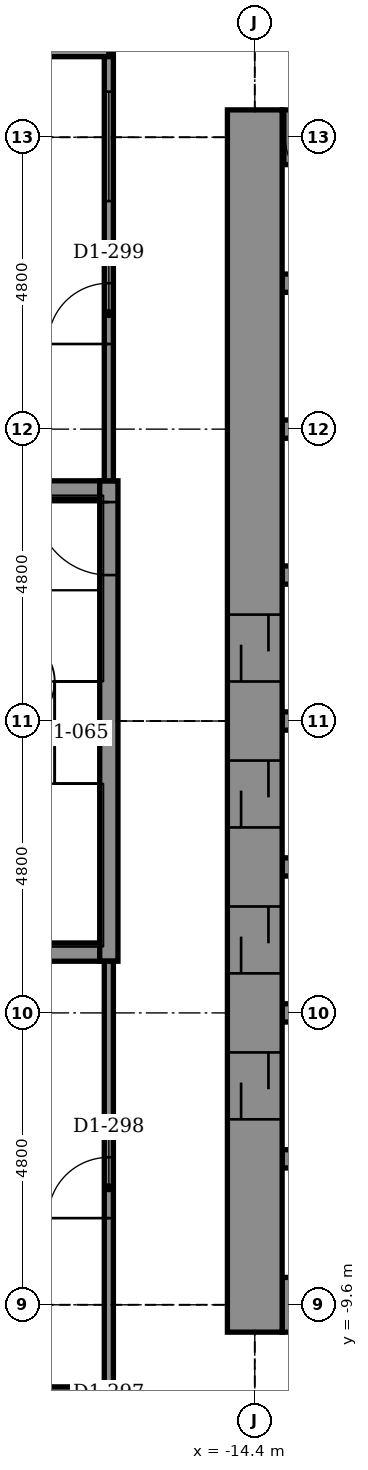
"""IFC4 building model, lengths in metres.
Left out: names, types, materials, properties, quantities, classifications, styles, units other than length and angle.
Written with IfcOpenShell. Run it as: python <this file> out.ifc"""

import sys

from ifc_helpers import new_model, si_unit, direction, frame, frame_2d, origin, place, context, subcontext, project, spatial, rectangle, extrude, element, fill, save


model = new_model("IFC4")
c1 = context("Model", 3, precision=1e-05, world=origin(), true_north=direction((0.0, 1.0)))
c2 = subcontext(c1, "Body", "Model", "MODEL_VIEW")
j1 = project(units=[si_unit("LENGTHUNIT", "METRE"), si_unit("PLANEANGLEUNIT", "RADIAN")], contexts=[c1])
p1 = place(None, origin())
s1 = spatial("IfcSite", under=j1, at=p1, CompositionType="ELEMENT")
p2 = place(p1, origin())
s2 = spatial("IfcBuilding", under=s1, at=p2, CompositionType="ELEMENT")
p3 = place(p2, frame((0.0, 0.0, 109.4)))
s3 = spatial("IfcBuildingStorey", under=s2, at=p3, CompositionType="ELEMENT", Elevation=109.4)
p4 = place(p3, frame((-13.95, -9.6, -0.2), z_axis=(0.0, 0.0, 1.0), x_axis=(1.0, 0.0, 0.0)))
e1 = element("IfcWall", 1, at=p4, inside=s3, PredefinedType="SHEAR", context=c2, shape_type="SweptSolid", body=[
    extrude(rectangle(XDim=3.9, YDim=0.9, at=frame_2d((1.95, 0.0))), origin(), (0.0, 0.0, 1.0), 4.5),
])
p5 = place(p4, frame((0.7, 0.0, 0.2)))
e2 = element("IfcOpeningElement", 2, at=p5, cuts=e1, PredefinedType="OPENING", context=c2, shape_type="SweptSolid", body=[
    extrude(rectangle(XDim=0.9, YDim=2.1, at=frame_2d((0.45, 1.05))), frame((0.0, 0.46, 0.0), z_axis=(0.0, -1.0, 0.0), x_axis=(1.0, 0.0, 0.0)), (0.0, 0.0, 1.0), 0.92),
])
p6 = place(p4, frame((2.95, 0.0, 0.2)))
e3 = element("IfcOpeningElement", 3, at=p6, cuts=e1, PredefinedType="OPENING", context=c2, shape_type="SweptSolid", body=[
    extrude(rectangle(XDim=0.9, YDim=2.1, at=frame_2d((0.45, 1.05))), frame((0.0, 0.46, 0.0), z_axis=(0.0, -1.0, 0.0), x_axis=(1.0, 0.0, 0.0)), (0.0, 0.0, 1.0), 0.92),
])
for number, where, z_axis, x_axis in (
    (4, (-13.95, -7.2, -0.2), (0.0, 0.0, 1.0), (1.0, 0.0, 0.0)),
    (5, (-13.95, -4.8, -0.2), (0.0, 0.0, 1.0), (1.0, 0.0, 0.0)),
):
    element("IfcWall", number, at=place(p3, frame(where, z_axis=z_axis, x_axis=x_axis)), inside=s3, PredefinedType="STANDARD", context=c2, shape_type="SweptSolid", body=[
        extrude(rectangle(XDim=3.9, YDim=0.3, at=frame_2d((1.95, 0.0))), origin(), (0.0, 0.0, 1.0), 4.5),
    ])
p7 = place(p3, frame((-21.45, -3.8, -0.2), z_axis=(0.0, 0.0, 1.0), x_axis=(1.0, 0.0, 0.0)))
e6 = element("IfcWall", 6, at=p7, inside=s3, PredefinedType="STANDARD", context=c2, shape_type="SweptSolid", body=[
    extrude(rectangle(XDim=4.5, YDim=0.3, at=frame_2d((2.25, 0.0))), origin(), (0.0, 0.0, 1.0), 4.5),
])
for number, where, z_axis, x_axis in (
    (7, (-13.95, -2.4, -0.2), (0.0, 0.0, 1.0), (1.0, 0.0, 0.0)),
    (8, (-13.95, 0.0, -0.2), (0.0, 0.0, 1.0), (1.0, 0.0, 0.0)),
    (9, (-13.95, 2.4, -0.2), (0.0, 0.0, 1.0), (1.0, 0.0, 0.0)),
):
    element("IfcWall", number, at=place(p3, frame(where, z_axis=z_axis, x_axis=x_axis)), inside=s3, PredefinedType="STANDARD", context=c2, shape_type="SweptSolid", body=[
        extrude(rectangle(XDim=2.8, YDim=0.3, at=frame_2d((1.4, 0.0))), origin(), (0.0, 0.0, 1.0), 4.5),
    ])
p8 = place(p3, frame((-21.45, 3.8, -0.2), z_axis=(0.0, 0.0, 1.0), x_axis=(1.0, 0.0, 0.0)))
e10 = element("IfcWall", 10, at=p8, inside=s3, PredefinedType="STANDARD", context=c2, shape_type="SweptSolid", body=[
    extrude(rectangle(XDim=4.5, YDim=0.3, at=frame_2d((2.25, 0.0))), origin(), (0.0, 0.0, 1.0), 4.5),
])
for number, where, z_axis, x_axis in (
    (11, (-13.95, 4.8, -0.2), (0.0, 0.0, 1.0), (1.0, 0.0, 0.0)),
    (12, (-13.95, 7.2, -0.2), (0.0, 0.0, 1.0), (1.0, 0.0, 0.0)),
):
    element("IfcWall", number, at=place(p3, frame(where, z_axis=z_axis, x_axis=x_axis)), inside=s3, PredefinedType="STANDARD", context=c2, shape_type="SweptSolid", body=[
        extrude(rectangle(XDim=3.9, YDim=0.3, at=frame_2d((1.95, 0.0))), origin(), (0.0, 0.0, 1.0), 4.5),
    ])
p9 = place(p3, frame((-13.95, 9.6, -0.2), z_axis=(0.0, 0.0, 1.0), x_axis=(1.0, 0.0, 0.0)))
e13 = element("IfcWall", 13, at=p9, inside=s3, PredefinedType="SHEAR", context=c2, shape_type="SweptSolid", body=[
    extrude(rectangle(XDim=3.9, YDim=0.9, at=frame_2d((1.95, 0.0))), origin(), (0.0, 0.0, 1.0), 4.5),
])
p10 = place(p9, frame((0.05, 0.0, 0.2)))
e14 = element("IfcOpeningElement", 14, at=p10, cuts=e13, PredefinedType="OPENING", context=c2, shape_type="SweptSolid", body=[
    extrude(rectangle(XDim=0.9, YDim=2.1, at=frame_2d((0.45, 1.05))), frame((0.0, 0.46, 0.0), z_axis=(0.0, -1.0, 0.0), x_axis=(1.0, 0.0, 0.0)), (0.0, 0.0, 1.0), 0.92),
])
p11 = place(p9, frame((2.3, 0.0, 0.2)))
e15 = element("IfcOpeningElement", 15, at=p11, cuts=e13, PredefinedType="OPENING", context=c2, shape_type="SweptSolid", body=[
    extrude(rectangle(XDim=0.9, YDim=2.1, at=frame_2d((0.45, 1.05))), frame((0.0, 0.46, 0.0), z_axis=(0.0, -1.0, 0.0), x_axis=(1.0, 0.0, 0.0)), (0.0, 0.0, 1.0), 0.92),
])
p12 = place(p3, frame((-16.8, -3.95, -0.2), z_axis=(0.0, 0.0, 1.0), x_axis=(0.0, 1.0, 0.0)))
e16 = element("IfcWall", 16, at=p12, inside=s3, PredefinedType="STANDARD", context=c2, shape_type="SweptSolid", body=[
    extrude(rectangle(XDim=7.9, YDim=0.3, at=frame_2d((3.95, 0.0))), origin(), (0.0, 0.0, 1.0), 4.5),
])
p13 = place(p12, frame((6.35, 0.0, 0.2)))
e17 = element("IfcOpeningElement", 17, at=p13, cuts=e16, PredefinedType="OPENING", context=c2, shape_type="SweptSolid", body=[
    extrude(rectangle(XDim=1.2, YDim=2.1, at=frame_2d((0.6, 1.05))), frame((0.0, 0.16, 0.0), z_axis=(0.0, -1.0, 0.0), x_axis=(1.0, 0.0, 0.0)), (0.0, 0.0, 1.0), 0.32),
])
p14 = place(p3, frame((-14.4, -10.05, -0.2), z_axis=(0.0, 0.0, 1.0), x_axis=(0.0, 1.0, 0.0)))
e18 = element("IfcWall", 18, at=p14, inside=s3, PredefinedType="SHEAR", context=c2, shape_type="SweptSolid", body=[
    extrude(rectangle(XDim=20.1, YDim=0.9, at=frame_2d((10.05, 0.0))), origin(), (0.0, 0.0, 1.0), 4.5),
])
p15 = place(p14, frame((3.5, 0.0, 0.2)))
e19 = element("IfcOpeningElement", 19, at=p15, cuts=e18, PredefinedType="OPENING", context=c2, shape_type="SweptSolid", body=[
    extrude(rectangle(XDim=1.1, YDim=2.1, at=frame_2d((0.55, 1.05))), frame((0.0, 0.46, 0.0), z_axis=(0.0, -1.0, 0.0), x_axis=(1.0, 0.0, 0.0)), (0.0, 0.0, 1.0), 0.92),
])
p16 = place(p14, frame((5.9, 0.0, 0.2)))
e20 = element("IfcOpeningElement", 20, at=p16, cuts=e18, PredefinedType="OPENING", context=c2, shape_type="SweptSolid", body=[
    extrude(rectangle(XDim=1.1, YDim=2.1, at=frame_2d((0.55, 1.05))), frame((0.0, 0.46, 0.0), z_axis=(0.0, -1.0, 0.0), x_axis=(1.0, 0.0, 0.0)), (0.0, 0.0, 1.0), 0.92),
])
p17 = place(p14, frame((8.3, 0.0, 0.2)))
e21 = element("IfcOpeningElement", 21, at=p17, cuts=e18, PredefinedType="OPENING", context=c2, shape_type="SweptSolid", body=[
    extrude(rectangle(XDim=1.1, YDim=2.1, at=frame_2d((0.55, 1.05))), frame((0.0, 0.46, 0.0), z_axis=(0.0, -1.0, 0.0), x_axis=(1.0, 0.0, 0.0)), (0.0, 0.0, 1.0), 0.92),
])
p18 = place(p14, frame((10.7, 0.0, 0.2)))
e22 = element("IfcOpeningElement", 22, at=p18, cuts=e18, PredefinedType="OPENING", context=c2, shape_type="SweptSolid", body=[
    extrude(rectangle(XDim=1.1, YDim=2.1, at=frame_2d((0.55, 1.05))), frame((0.0, 0.46, 0.0), z_axis=(0.0, -1.0, 0.0), x_axis=(1.0, 0.0, 0.0)), (0.0, 0.0, 1.0), 0.92),
])
p19 = place(p3, frame((-16.8, -13.3, 0.0), z_axis=(0.0, 0.0, 1.0), x_axis=(0.0, 1.0, 0.0)))
e23 = element("IfcWall", 23, at=p19, inside=s3, PredefinedType="PARTITIONING", context=c2, shape_type="SweptSolid", body=[
    extrude(rectangle(XDim=9.35, YDim=0.15, at=frame_2d((4.675, 0.0))), origin(), (0.0, 0.0, 1.0), 4.3),
])
p20 = place(p19, frame((0.75, 0.0, 0.0)))
e24 = element("IfcOpeningElement", 24, at=p20, cuts=e23, PredefinedType="OPENING", context=c2, shape_type="SweptSolid", body=[
    extrude(rectangle(XDim=1.0, YDim=2.1, at=frame_2d((0.5, 1.05))), frame((0.0, 0.085, 0.0), z_axis=(0.0, -1.0, 0.0), x_axis=(1.0, 0.0, 0.0)), (0.0, 0.0, 1.0), 0.17),
])
p21 = place(p19, frame((5.125, 0.0, 0.0)))
e25 = element("IfcOpeningElement", 25, at=p21, cuts=e23, PredefinedType="OPENING", context=c2, shape_type="SweptSolid", body=[
    extrude(rectangle(XDim=1.0, YDim=2.1, at=frame_2d((0.5, 1.05))), frame((0.0, 0.085, 0.0), z_axis=(0.0, -1.0, 0.0), x_axis=(1.0, 0.0, 0.0)), (0.0, 0.0, 1.0), 0.17),
])
p22 = place(p3, frame((-16.8, 3.95, 0.0), z_axis=(0.0, 0.0, 1.0), x_axis=(0.0, 1.0, 0.0)))
e26 = element("IfcWall", 26, at=p22, inside=s3, PredefinedType="PARTITIONING", context=c2, shape_type="SweptSolid", body=[
    extrude(rectangle(XDim=8.75, YDim=0.15, at=frame_2d((4.375, 0.0))), origin(), (0.0, 0.0, 1.0), 4.3),
])
p23 = place(p22, frame((2.25, 0.0, 0.0)))
e27 = element("IfcOpeningElement", 27, at=p23, cuts=e26, PredefinedType="OPENING", context=c2, shape_type="SweptSolid", body=[
    extrude(rectangle(XDim=1.0, YDim=2.1, at=frame_2d((0.5, 1.05))), frame((0.0, 0.085, 0.0), z_axis=(0.0, -1.0, 0.0), x_axis=(1.0, 0.0, 0.0)), (0.0, 0.0, 1.0), 0.17),
])
p24 = place(p22, frame((4.6, 0.0, 0.9)))
e28 = element("IfcOpeningElement", 28, at=p24, cuts=e26, PredefinedType="OPENING", context=c2, shape_type="SweptSolid", body=[
    extrude(rectangle(XDim=1.8, YDim=1.5, at=frame_2d((0.9, 0.75))), frame((0.0, 0.085, 0.0), z_axis=(0.0, -1.0, 0.0), x_axis=(1.0, 0.0, 0.0)), (0.0, 0.0, 1.0), 0.17),
])
p25 = place(p3, frame((-25.378, -11.0, 0.0), z_axis=(0.0, 0.0, 1.0), x_axis=(1.0, 0.0, 0.0)))
e29 = element("IfcWall", 29, at=p25, inside=s3, PredefinedType="PARTITIONING", context=c2, shape_type="SweptSolid", body=[
    extrude(rectangle(XDim=8.578, YDim=0.1, at=frame_2d((4.289, 0.0))), origin(), (0.0, 0.0, 1.0), 4.3),
])
p26 = place(p3, frame((-25.378, 11.0, 0.0), z_axis=(0.0, 0.0, 1.0), x_axis=(1.0, 0.0, 0.0)))
e30 = element("IfcWall", 30, at=p26, inside=s3, PredefinedType="PARTITIONING", context=c2, shape_type="SweptSolid", body=[
    extrude(rectangle(XDim=8.578, YDim=0.15, at=frame_2d((4.289, 0.0))), origin(), (0.0, 0.0, 1.0), 4.3),
])
p27 = place(p21, origin())
e31 = element("IfcDoor", 31, at=p27, inside=s3, OperationType="SINGLE_SWING_LEFT", PredefinedType="DOOR", context=c2, shape_type="SweptSolid", body=[
    extrude(rectangle(XDim=1.0, YDim=2.1, at=frame_2d((0.5, 1.05))), frame((0.0, 0.025, 0.0), z_axis=(0.0, -1.0, 0.0), x_axis=(1.0, 0.0, 0.0)), (0.0, 0.0, 1.0), 0.05),
])
fill(e25, e31)
p28 = place(p23, origin())
e32 = element("IfcDoor", 32, at=p28, inside=s3, OperationType="SINGLE_SWING_LEFT", PredefinedType="DOOR", context=c2, shape_type="SweptSolid", body=[
    extrude(rectangle(XDim=1.0, YDim=2.1, at=frame_2d((0.5, 1.05))), frame((0.0, 0.025, 0.0), z_axis=(0.0, -1.0, 0.0), x_axis=(1.0, 0.0, 0.0)), (0.0, 0.0, 1.0), 0.05),
])
fill(e27, e32)
p29 = place(p15, origin())
e33 = element("IfcDoor", 33, at=p29, inside=s3, OperationType="DOUBLE_DOOR_SLIDING", PredefinedType="DOOR", context=c2, shape_type="SweptSolid", body=[
    extrude(rectangle(XDim=1.1, YDim=2.1, at=frame_2d((0.55, 1.05))), frame((0.0, 0.025, 0.0), z_axis=(0.0, -1.0, 0.0), x_axis=(1.0, 0.0, 0.0)), (0.0, 0.0, 1.0), 0.05),
])
fill(e19, e33)
p30 = place(p16, origin())
e34 = element("IfcDoor", 34, at=p30, inside=s3, OperationType="DOUBLE_DOOR_SLIDING", PredefinedType="DOOR", context=c2, shape_type="SweptSolid", body=[
    extrude(rectangle(XDim=1.1, YDim=2.1, at=frame_2d((0.55, 1.05))), frame((0.0, 0.025, 0.0), z_axis=(0.0, -1.0, 0.0), x_axis=(1.0, 0.0, 0.0)), (0.0, 0.0, 1.0), 0.05),
])
fill(e20, e34)
p31 = place(p17, origin())
e35 = element("IfcDoor", 35, at=p31, inside=s3, OperationType="DOUBLE_DOOR_SLIDING", PredefinedType="DOOR", context=c2, shape_type="SweptSolid", body=[
    extrude(rectangle(XDim=1.1, YDim=2.1, at=frame_2d((0.55, 1.05))), frame((0.0, 0.025, 0.0), z_axis=(0.0, -1.0, 0.0), x_axis=(1.0, 0.0, 0.0)), (0.0, 0.0, 1.0), 0.05),
])
fill(e21, e35)
p32 = place(p18, origin())
e36 = element("IfcDoor", 36, at=p32, inside=s3, OperationType="DOUBLE_DOOR_SLIDING", PredefinedType="DOOR", context=c2, shape_type="SweptSolid", body=[
    extrude(rectangle(XDim=1.1, YDim=2.1, at=frame_2d((0.55, 1.05))), frame((0.0, 0.025, 0.0), z_axis=(0.0, -1.0, 0.0), x_axis=(1.0, 0.0, 0.0)), (0.0, 0.0, 1.0), 0.05),
])
fill(e22, e36)
p33 = place(p13, origin())
e37 = element("IfcDoor", 37, at=p33, inside=s3, OperationType="SINGLE_SWING_RIGHT", PredefinedType="DOOR", context=c2, shape_type="SweptSolid", body=[
    extrude(rectangle(XDim=1.2, YDim=2.1, at=frame_2d((0.6, 1.05))), frame((0.0, 0.025, 0.0), z_axis=(0.0, -1.0, 0.0), x_axis=(1.0, 0.0, 0.0)), (0.0, 0.0, 1.0), 0.05),
])
fill(e17, e37)
p34 = place(p10, frame((0.9, 0.0, 0.0), z_axis=(0.0, 0.0, 1.0), x_axis=(-1.0, 0.0, 0.0)))
e38 = element("IfcDoor", 38, at=p34, inside=s3, OperationType="SINGLE_SWING_RIGHT", PredefinedType="DOOR", context=c2, shape_type="SweptSolid", body=[
    extrude(rectangle(XDim=0.9, YDim=2.1, at=frame_2d((0.45, 1.05))), frame((0.0, 0.025, 0.0), z_axis=(0.0, -1.0, 0.0), x_axis=(1.0, 0.0, 0.0)), (0.0, 0.0, 1.0), 0.05),
])
fill(e14, e38)
p35 = place(p24, origin())
e39 = element("IfcWindow", 39, at=p35, inside=s3, PartitioningType="SINGLE_PANEL", PredefinedType="WINDOW", context=c2, shape_type="SweptSolid", body=[
    extrude(rectangle(XDim=1.8, YDim=1.5, at=frame_2d((0.9, 0.75))), frame((0.0, 0.03, 0.0), z_axis=(0.0, -1.0, 0.0), x_axis=(1.0, 0.0, 0.0)), (0.0, 0.0, 1.0), 0.06),
])
fill(e28, e39)
save(model, sys.argv[1])
